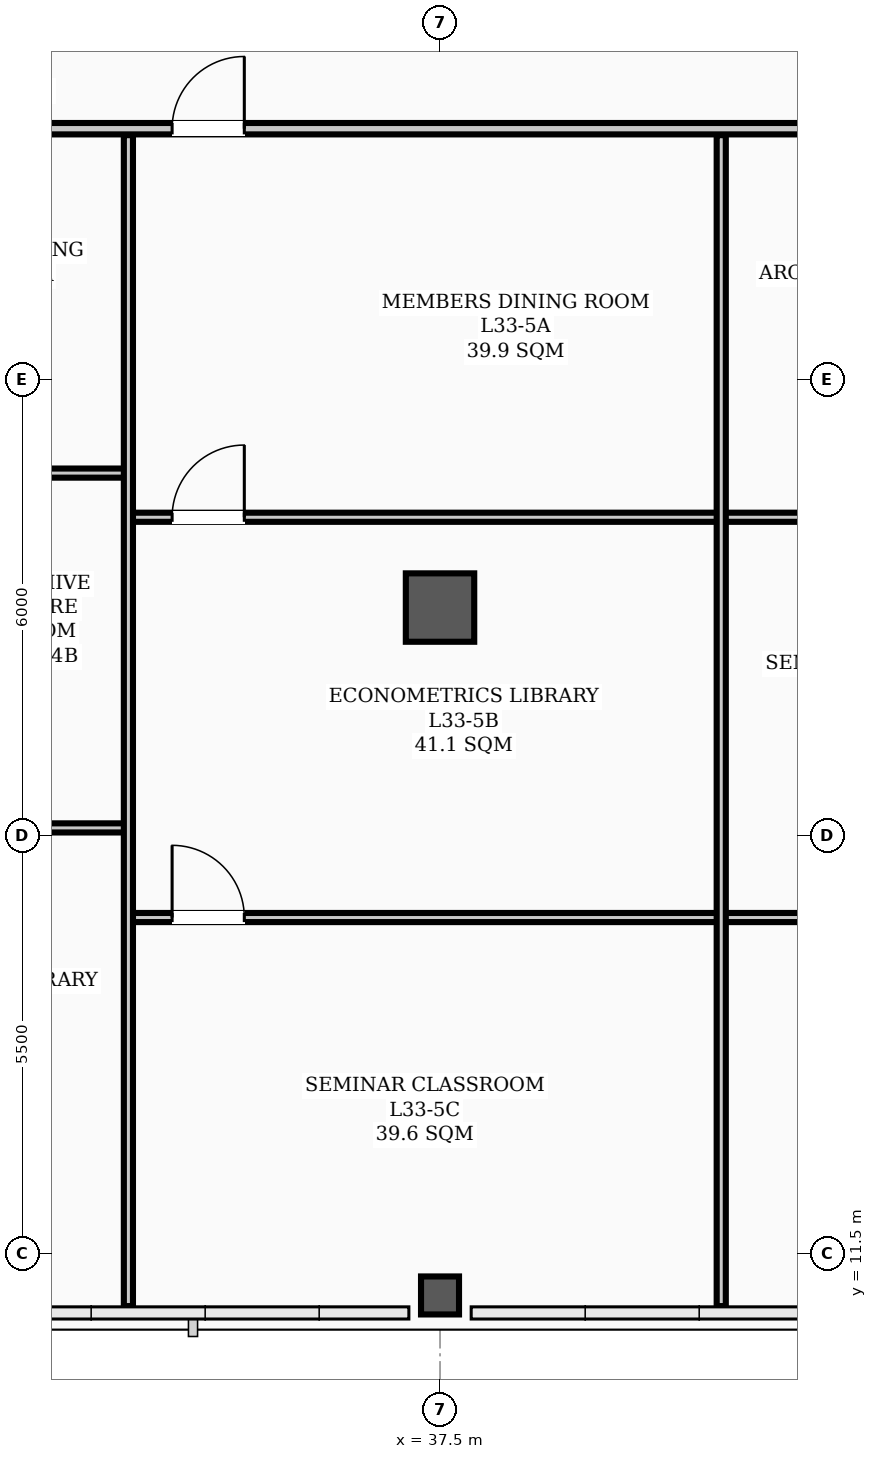
"""IFC4 building model, lengths in metres.
Left out: names, types, materials, properties, quantities, classifications, styles, units other than length and angle.
Written with IfcOpenShell. Run it as: python <this file> out.ifc"""

import sys

from ifc_helpers import new_model, si_unit, direction, frame, frame_2d, origin, origin_2d, place, context, subcontext, project, spatial, rectangle, hollow_rectangle, extrude, element, fill, save


model = new_model("IFC4")
c1 = context("Model", 3, precision=1e-05, world=origin(), true_north=direction((0.0, 1.0)))
c2 = subcontext(c1, "Body", "Model", "MODEL_VIEW")
j1 = project(units=[si_unit("LENGTHUNIT", "METRE"), si_unit("PLANEANGLEUNIT", "RADIAN")], contexts=[c1])
p1 = place(None, origin())
s1 = spatial("IfcSite", under=j1, at=p1, CompositionType="ELEMENT")
p2 = place(p1, origin())
s2 = spatial("IfcBuilding", under=s1, at=p2, CompositionType="ELEMENT")
p3 = place(p2, frame((0.0, 0.0, 134.4)))
s3 = spatial("IfcBuildingStorey", under=s2, at=p3, CompositionType="ELEMENT", Elevation=134.4)
p4 = place(p3, frame((37.5, 20.0, 0.0), z_axis=(0.0, 0.0, 1.0), x_axis=(1.0, 0.0, 0.0)))
e1 = element("IfcColumn", 1, at=p4, inside=s3, PredefinedType="COLUMN", context=c2, shape_type="SweptSolid", body=[
    extrude(hollow_rectangle(XDim=0.9, YDim=0.9, WallThickness=0.035, InnerFilletRadius=0.017, OuterFilletRadius=0.052, at=origin_2d()), origin(), (0.0, 0.0, 1.0), 3.9),
])
p5 = place(p3, frame((37.5, 10.95, 0.0), z_axis=(0.0, 0.0, 1.0), x_axis=(1.0, 0.0, 0.0)))
e2 = element("IfcColumn", 2, at=p5, inside=s3, PredefinedType="COLUMN", context=c2, shape_type="SweptSolid", body=[
    extrude(hollow_rectangle(XDim=0.5, YDim=0.5, WallThickness=0.024, InnerFilletRadius=0.012, OuterFilletRadius=0.036, at=origin_2d()), origin(), (0.0, 0.0, 1.0), 3.9),
])
p6 = place(p3, frame((2.31, 26.3, 0.0), z_axis=(0.0, 0.0, 1.0), x_axis=(1.0, 0.0, 0.0)))
e3 = element("IfcWall", 3, at=p6, inside=s3, PredefinedType="PARTITIONING", context=c2, shape_type="SweptSolid", body=[
    extrude(rectangle(XDim=46.38, YDim=0.15, at=frame_2d((23.19, 0.0))), origin(), (0.0, 0.0, 1.0), 3.1),
])
p7 = place(p6, frame((12.515, 0.0, 0.0)))
e4 = element("IfcOpeningElement", 4, at=p7, cuts=e3, PredefinedType="OPENING", context=c2, shape_type="SweptSolid", body=[
    extrude(rectangle(XDim=0.95, YDim=2.08, at=frame_2d((0.475, 1.04))), frame((0.0, 0.085, 0.0), z_axis=(0.0, -1.0, 0.0), x_axis=(1.0, 0.0, 0.0)), (0.0, 0.0, 1.0), 0.17),
])
p8 = place(p6, frame((18.615, 0.0, 0.0)))
e5 = element("IfcOpeningElement", 5, at=p8, cuts=e3, PredefinedType="OPENING", context=c2, shape_type="SweptSolid", body=[
    extrude(rectangle(XDim=0.95, YDim=2.08, at=frame_2d((0.475, 1.04))), frame((0.0, 0.085, 0.0), z_axis=(0.0, -1.0, 0.0), x_axis=(1.0, 0.0, 0.0)), (0.0, 0.0, 1.0), 0.17),
])
p9 = place(p6, frame((26.115, 0.0, 0.0)))
e6 = element("IfcOpeningElement", 6, at=p9, cuts=e3, PredefinedType="OPENING", context=c2, shape_type="SweptSolid", body=[
    extrude(rectangle(XDim=0.95, YDim=2.08, at=frame_2d((0.475, 1.04))), frame((0.0, 0.085, 0.0), z_axis=(0.0, -1.0, 0.0), x_axis=(1.0, 0.0, 0.0)), (0.0, 0.0, 1.0), 0.17),
])
p10 = place(p6, frame((31.665, 0.0, 0.0)))
e7 = element("IfcOpeningElement", 7, at=p10, cuts=e3, PredefinedType="OPENING", context=c2, shape_type="SweptSolid", body=[
    extrude(rectangle(XDim=0.95, YDim=2.08, at=frame_2d((0.475, 1.04))), frame((0.0, 0.085, 0.0), z_axis=(0.0, -1.0, 0.0), x_axis=(1.0, 0.0, 0.0)), (0.0, 0.0, 1.0), 0.17),
])
p11 = place(p6, frame((43.06, 0.0, 0.0)))
e8 = element("IfcOpeningElement", 8, at=p11, cuts=e3, PredefinedType="OPENING", context=c2, shape_type="SweptSolid", body=[
    extrude(rectangle(XDim=0.95, YDim=2.08, at=frame_2d((0.475, 1.04))), frame((0.0, 0.085, 0.0), z_axis=(0.0, -1.0, 0.0), x_axis=(1.0, 0.0, 0.0)), (0.0, 0.0, 1.0), 0.17),
])
p12 = place(p3, frame((24.4, 21.769, 0.0), z_axis=(0.0, 0.0, 1.0), x_axis=(1.0, 0.0, 0.0)))
e9 = element("IfcWall", 9, at=p12, inside=s3, PredefinedType="PARTITIONING", context=c2, shape_type="SweptSolid", body=[
    extrude(rectangle(XDim=9.0, YDim=0.12, at=frame_2d((4.5, 0.0))), origin(), (0.0, 0.0, 1.0), 3.1),
])
p13 = place(p12, frame((4.025, 0.0, 0.0)))
e10 = element("IfcOpeningElement", 10, at=p13, cuts=e9, PredefinedType="OPENING", context=c2, shape_type="SweptSolid", body=[
    extrude(rectangle(XDim=0.95, YDim=2.08, at=frame_2d((0.475, 1.04))), frame((0.0, 0.07, 0.0), z_axis=(0.0, -1.0, 0.0), x_axis=(1.0, 0.0, 0.0)), (0.0, 0.0, 1.0), 0.14),
])
p14 = place(p3, frame((24.4, 17.101, 0.0), z_axis=(0.0, 0.0, 1.0), x_axis=(1.0, 0.0, 0.0)))
e11 = element("IfcWall", 11, at=p14, inside=s3, PredefinedType="PARTITIONING", context=c2, shape_type="SweptSolid", body=[
    extrude(rectangle(XDim=9.0, YDim=0.12, at=frame_2d((4.5, 0.0))), origin(), (0.0, 0.0, 1.0), 3.1),
])
p15 = place(p14, frame((4.025, 0.0, 0.0)))
e12 = element("IfcOpeningElement", 12, at=p15, cuts=e11, PredefinedType="OPENING", context=c2, shape_type="SweptSolid", body=[
    extrude(rectangle(XDim=0.95, YDim=2.08, at=frame_2d((0.475, 1.04))), frame((0.0, 0.07, 0.0), z_axis=(0.0, -1.0, 0.0), x_axis=(1.0, 0.0, 0.0)), (0.0, 0.0, 1.0), 0.14),
])
p16 = place(p3, frame((33.4, 21.188, 0.0), z_axis=(0.0, 0.0, 1.0), x_axis=(1.0, 0.0, 0.0)))
e13 = element("IfcWall", 13, at=p16, inside=s3, PredefinedType="PARTITIONING", context=c2, shape_type="SweptSolid", body=[
    extrude(rectangle(XDim=7.8, YDim=0.12, at=frame_2d((3.9, 0.0))), origin(), (0.0, 0.0, 1.0), 3.1),
])
p17 = place(p16, frame((0.575, 0.0, 0.0)))
e14 = element("IfcOpeningElement", 14, at=p17, cuts=e13, PredefinedType="OPENING", context=c2, shape_type="SweptSolid", body=[
    extrude(rectangle(XDim=0.95, YDim=2.08, at=frame_2d((0.475, 1.04))), frame((0.0, 0.07, 0.0), z_axis=(0.0, -1.0, 0.0), x_axis=(1.0, 0.0, 0.0)), (0.0, 0.0, 1.0), 0.14),
])
p18 = place(p3, frame((33.4, 15.922, 0.0), z_axis=(0.0, 0.0, 1.0), x_axis=(1.0, 0.0, 0.0)))
e15 = element("IfcWall", 15, at=p18, inside=s3, PredefinedType="PARTITIONING", context=c2, shape_type="SweptSolid", body=[
    extrude(rectangle(XDim=7.8, YDim=0.12, at=frame_2d((3.9, 0.0))), origin(), (0.0, 0.0, 1.0), 3.1),
])
p19 = place(p18, frame((0.575, 0.0, 0.0)))
e16 = element("IfcOpeningElement", 16, at=p19, cuts=e15, PredefinedType="OPENING", context=c2, shape_type="SweptSolid", body=[
    extrude(rectangle(XDim=0.95, YDim=2.08, at=frame_2d((0.475, 1.04))), frame((0.0, 0.07, 0.0), z_axis=(0.0, -1.0, 0.0), x_axis=(1.0, 0.0, 0.0)), (0.0, 0.0, 1.0), 0.14),
])
p20 = place(p3, frame((41.2, 21.188, 0.0), z_axis=(0.0, 0.0, 1.0), x_axis=(1.0, 0.0, 0.0)))
e17 = element("IfcWall", 17, at=p20, inside=s3, PredefinedType="PARTITIONING", context=c2, shape_type="SweptSolid", body=[
    extrude(rectangle(XDim=7.49, YDim=0.12, at=frame_2d((3.745, 0.0))), origin(), (0.0, 0.0, 1.0), 3.1),
])
p21 = place(p20, frame((4.17, 0.0, 0.0)))
e18 = element("IfcOpeningElement", 18, at=p21, cuts=e17, PredefinedType="OPENING", context=c2, shape_type="SweptSolid", body=[
    extrude(rectangle(XDim=0.95, YDim=2.08, at=frame_2d((0.475, 1.04))), frame((0.0, 0.07, 0.0), z_axis=(0.0, -1.0, 0.0), x_axis=(1.0, 0.0, 0.0)), (0.0, 0.0, 1.0), 0.14),
])
p22 = place(p3, frame((41.2, 15.922, 0.0), z_axis=(0.0, 0.0, 1.0), x_axis=(1.0, 0.0, 0.0)))
e19 = element("IfcWall", 19, at=p22, inside=s3, PredefinedType="PARTITIONING", context=c2, shape_type="SweptSolid", body=[
    extrude(rectangle(XDim=7.49, YDim=0.12, at=frame_2d((3.745, 0.0))), origin(), (0.0, 0.0, 1.0), 3.1),
])
p23 = place(p22, frame((4.17, 0.0, 0.0)))
e20 = element("IfcOpeningElement", 20, at=p23, cuts=e19, PredefinedType="OPENING", context=c2, shape_type="SweptSolid", body=[
    extrude(rectangle(XDim=0.95, YDim=2.08, at=frame_2d((0.475, 1.04))), frame((0.0, 0.07, 0.0), z_axis=(0.0, -1.0, 0.0), x_axis=(1.0, 0.0, 0.0)), (0.0, 0.0, 1.0), 0.14),
])
for number, where, z_axis, x_axis in (
    (21, (33.4, 10.81, 0.0), (0.0, 0.0, 1.0), (0.0, 1.0, 0.0)),
    (22, (41.2, 10.81, 0.0), (0.0, 0.0, 1.0), (0.0, 1.0, 0.0)),
):
    element("IfcWall", number, at=place(p3, frame(where, z_axis=z_axis, x_axis=x_axis)), inside=s3, PredefinedType="PARTITIONING", context=c2, shape_type="SweptSolid", body=[
        extrude(rectangle(XDim=15.405, YDim=0.12, at=frame_2d((7.703, 0.0))), origin(), (0.0, 0.0, 1.0), 3.0),
    ])
p24 = place(p17, origin())
e23 = element("IfcDoor", 23, at=p24, inside=s3, OperationType="SINGLE_SWING_RIGHT", PredefinedType="DOOR", context=c2, shape_type="SweptSolid", body=[
    extrude(rectangle(XDim=0.95, YDim=2.08, at=frame_2d((0.475, 1.04))), frame((0.0, 0.025, 0.0), z_axis=(0.0, -1.0, 0.0), x_axis=(1.0, 0.0, 0.0)), (0.0, 0.0, 1.0), 0.05),
])
fill(e14, e23)
p25 = place(p19, origin())
e24 = element("IfcDoor", 24, at=p25, inside=s3, OperationType="SINGLE_SWING_LEFT", PredefinedType="DOOR", context=c2, shape_type="SweptSolid", body=[
    extrude(rectangle(XDim=0.95, YDim=2.08, at=frame_2d((0.475, 1.04))), frame((0.0, 0.025, 0.0), z_axis=(0.0, -1.0, 0.0), x_axis=(1.0, 0.0, 0.0)), (0.0, 0.0, 1.0), 0.05),
])
fill(e16, e24)
p26 = place(p10, origin())
e25 = element("IfcDoor", 25, at=p26, inside=s3, OperationType="SINGLE_SWING_RIGHT", PredefinedType="DOOR", context=c2, shape_type="SweptSolid", body=[
    extrude(rectangle(XDim=0.95, YDim=2.08, at=frame_2d((0.475, 1.04))), frame((0.0, 0.025, 0.0), z_axis=(0.0, -1.0, 0.0), x_axis=(1.0, 0.0, 0.0)), (0.0, 0.0, 1.0), 0.05),
])
fill(e7, e25)
save(model, sys.argv[1])
